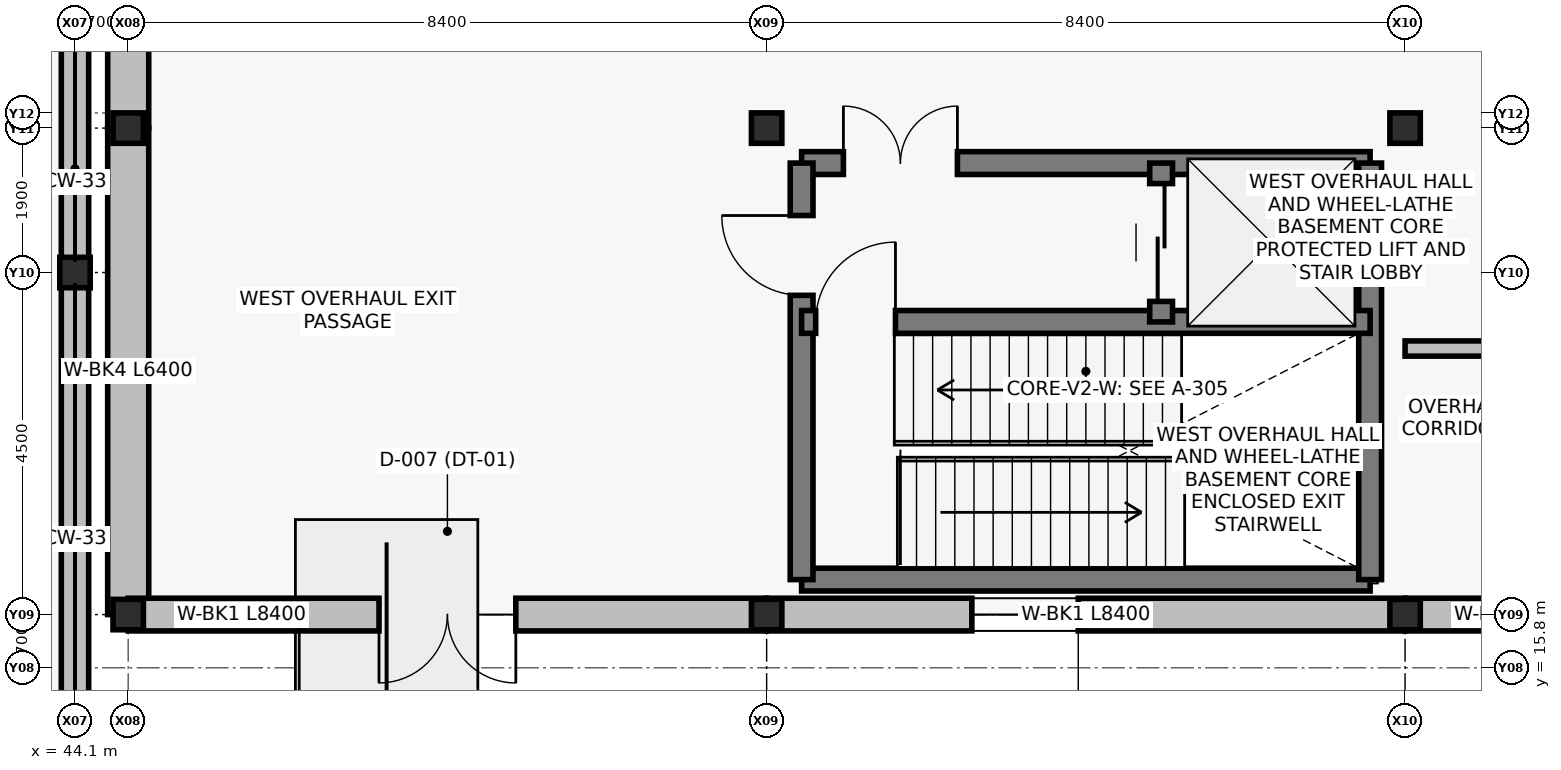
"""IFC4 building model, lengths in metres.
Left out: names, types, materials, properties, quantities, classifications, styles, units other than length and angle.
Written with IfcOpenShell. Run it as: python <this file> out.ifc"""

import sys

from ifc_helpers import new_model, si_unit, direction, frame, frame_2d, origin, origin_2d, place, context, subcontext, project, spatial, rectangle, i_section, extrude, element, fill, save


model = new_model("IFC4")
c1 = context("Model", 3, precision=1e-05, world=origin(), true_north=direction((0.0, 1.0)))
c2 = subcontext(c1, "Body", "Model", "MODEL_VIEW")
j1 = project(units=[si_unit("LENGTHUNIT", "METRE"), si_unit("PLANEANGLEUNIT", "RADIAN")], contexts=[c1])
p1 = place(None, origin())
s1 = spatial("IfcSite", under=j1, at=p1, CompositionType="ELEMENT")
p2 = place(p1, origin())
s2 = spatial("IfcBuilding", under=s1, at=p2, CompositionType="ELEMENT")
p3 = place(p2, origin())
s3 = spatial("IfcBuildingStorey", under=s2, at=p3, CompositionType="ELEMENT", Elevation=0.0)
for number, where, z_axis, x_axis in (
    (1, (44.8, 16.5, -0.35), (0.0, 0.0, 1.0), (1.0, 0.0, 0.0)),
    (2, (44.8, 22.9, -0.35), (0.0, 0.0, 1.0), (1.0, 0.0, 0.0)),
    (3, (53.2, 16.5, -0.35), (0.0, 0.0, 1.0), (1.0, 0.0, 0.0)),
    (4, (53.2, 22.9, -0.35), (0.0, 0.0, 1.0), (1.0, 0.0, 0.0)),
    (5, (61.6, 16.5, -0.35), (0.0, 0.0, 1.0), (1.0, 0.0, 0.0)),
    (6, (61.6, 22.9, -0.35), (0.0, 0.0, 1.0), (1.0, 0.0, 0.0)),
    (7, (44.1, 21.0, -0.35), (0.0, 0.0, 1.0), (1.0, 0.0, 0.0)),
):
    element("IfcColumn", number, at=place(p3, frame(where, z_axis=z_axis, x_axis=x_axis)), inside=s3, PredefinedType="COLUMN", context=c2, shape_type="SweptSolid", body=[
        extrude(i_section(OverallWidth=0.4, OverallDepth=0.4, WebThickness=0.013, FlangeThickness=0.021, at=origin_2d()), origin(), (0.0, 0.0, 1.0), 6.35),
    ])
p4 = place(p3, frame((44.8, 22.9, 0.0), z_axis=(0.0, 0.0, 1.0), x_axis=(0.0, 1.0, 0.0)))
e8 = element("IfcWall", 8, at=p4, inside=s3, PredefinedType="SOLIDWALL", context=c2, shape_type="SweptSolid", body=[
    extrude(rectangle(XDim=32.0, YDim=0.54, at=frame_2d((16.0, 0.0))), origin(), (0.0, 0.0, 1.0), 5.14),
])
p5 = place(p4, frame((1.3, 0.0, 0.0)))
e9 = element("IfcOpeningElement", 9, at=p5, cuts=e8, PredefinedType="OPENING", context=c2, shape_type="SweptSolid", body=[
    extrude(rectangle(XDim=3.8, YDim=4.4, at=frame_2d((1.9, 2.2))), frame((0.0, 0.28, 0.0), z_axis=(0.0, -1.0, 0.0), x_axis=(1.0, 0.0, 0.0)), (0.0, 0.0, 1.0), 0.56),
])
p6 = place(p4, frame((7.7, 0.0, 0.0)))
e10 = element("IfcOpeningElement", 10, at=p6, cuts=e8, PredefinedType="OPENING", context=c2, shape_type="SweptSolid", body=[
    extrude(rectangle(XDim=3.8, YDim=4.4, at=frame_2d((1.9, 2.2))), frame((0.0, 0.28, 0.0), z_axis=(0.0, -1.0, 0.0), x_axis=(1.0, 0.0, 0.0)), (0.0, 0.0, 1.0), 0.56),
])
p7 = place(p4, frame((14.1, 0.0, 0.0)))
e11 = element("IfcOpeningElement", 11, at=p7, cuts=e8, PredefinedType="OPENING", context=c2, shape_type="SweptSolid", body=[
    extrude(rectangle(XDim=3.8, YDim=4.4, at=frame_2d((1.9, 2.2))), frame((0.0, 0.28, 0.0), z_axis=(0.0, -1.0, 0.0), x_axis=(1.0, 0.0, 0.0)), (0.0, 0.0, 1.0), 0.56),
])
p8 = place(p4, frame((20.5, 0.0, 0.0)))
e12 = element("IfcOpeningElement", 12, at=p8, cuts=e8, PredefinedType="OPENING", context=c2, shape_type="SweptSolid", body=[
    extrude(rectangle(XDim=3.8, YDim=4.4, at=frame_2d((1.9, 2.2))), frame((0.0, 0.28, 0.0), z_axis=(0.0, -1.0, 0.0), x_axis=(1.0, 0.0, 0.0)), (0.0, 0.0, 1.0), 0.56),
])
p9 = place(p4, frame((26.9, 0.0, 0.0)))
e13 = element("IfcOpeningElement", 13, at=p9, cuts=e8, PredefinedType="OPENING", context=c2, shape_type="SweptSolid", body=[
    extrude(rectangle(XDim=3.8, YDim=4.4, at=frame_2d((1.9, 2.2))), frame((0.0, 0.28, 0.0), z_axis=(0.0, -1.0, 0.0), x_axis=(1.0, 0.0, 0.0)), (0.0, 0.0, 1.0), 0.56),
])
p10 = place(p3, frame((44.8, 16.5, 0.0), z_axis=(0.0, 0.0, 1.0), x_axis=(0.0, 1.0, 0.0)))
e14 = element("IfcWall", 14, at=p10, inside=s3, PredefinedType="SOLIDWALL", context=c2, shape_type="SweptSolid", body=[
    extrude(rectangle(XDim=6.4, YDim=0.54, at=frame_2d((3.2, 0.0))), origin(), (0.0, 0.0, 1.0), 5.14),
])
p11 = place(p3, frame((44.8, 16.5, 0.0), z_axis=(0.0, 0.0, 1.0), x_axis=(1.0, 0.0, 0.0)))
e15 = element("IfcWall", 15, at=p11, inside=s3, PredefinedType="SOLIDWALL", context=c2, shape_type="SweptSolid", body=[
    extrude(rectangle(XDim=8.4, YDim=0.43, at=frame_2d((4.2, 0.0))), origin(), (0.0, 0.0, 1.0), 5.14),
])
p12 = place(p11, frame((3.3, 0.0, 0.0)))
e16 = element("IfcOpeningElement", 16, at=p12, cuts=e15, PredefinedType="OPENING", context=c2, shape_type="SweptSolid", body=[
    extrude(rectangle(XDim=1.8, YDim=2.4, at=frame_2d((0.9, 1.2))), frame((0.0, 0.225, 0.0), z_axis=(0.0, -1.0, 0.0), x_axis=(1.0, 0.0, 0.0)), (0.0, 0.0, 1.0), 0.45),
])
p13 = place(p3, frame((53.2, 16.5, 0.0), z_axis=(0.0, 0.0, 1.0), x_axis=(1.0, 0.0, 0.0)))
e17 = element("IfcWall", 17, at=p13, inside=s3, PredefinedType="SOLIDWALL", context=c2, shape_type="SweptSolid", body=[
    extrude(rectangle(XDim=8.4, YDim=0.43, at=frame_2d((4.2, 0.0))), origin(), (0.0, 0.0, 1.0), 5.14),
])
p14 = place(p13, frame((2.7, 0.0, 1.1)))
e18 = element("IfcOpeningElement", 18, at=p14, cuts=e17, PredefinedType="OPENING", context=c2, shape_type="SweptSolid", body=[
    extrude(rectangle(XDim=1.4, YDim=1.6, at=frame_2d((0.7, 0.8))), frame((0.0, 0.225, 0.0), z_axis=(0.0, -1.0, 0.0), x_axis=(1.0, 0.0, 0.0)), (0.0, 0.0, 1.0), 0.45),
])
p15 = place(p3, frame((61.6, 16.5, 0.0), z_axis=(0.0, 0.0, 1.0), x_axis=(1.0, 0.0, 0.0)))
e19 = element("IfcWall", 19, at=p15, inside=s3, PredefinedType="SOLIDWALL", context=c2, shape_type="SweptSolid", body=[
    extrude(rectangle(XDim=8.4, YDim=0.43, at=frame_2d((4.2, 0.0))), origin(), (0.0, 0.0, 1.0), 5.14),
])
p16 = place(p15, frame((3.3, 0.0, 0.0)))
e20 = element("IfcOpeningElement", 20, at=p16, cuts=e19, PredefinedType="OPENING", context=c2, shape_type="SweptSolid", body=[
    extrude(rectangle(XDim=1.8, YDim=2.4, at=frame_2d((0.9, 1.2))), frame((0.0, 0.225, 0.0), z_axis=(0.0, -1.0, 0.0), x_axis=(1.0, 0.0, 0.0)), (0.0, 0.0, 1.0), 0.45),
])
for number, where, z_axis, x_axis in (
    (21, (44.1, 14.0, 0.0), (0.0, 0.0, 1.0), (0.0, 1.0, 0.0)),
    (22, (44.1, 21.0, 0.0), (0.0, 0.0, 1.0), (0.0, 1.0, 0.0)),
):
    element("IfcWall", number, at=place(p3, frame(where, z_axis=z_axis, x_axis=x_axis)), inside=s3, PredefinedType="SOLIDWALL", context=c2, shape_type="SweptSolid", body=[
        extrude(rectangle(XDim=7.0, YDim=0.36, at=frame_2d((3.5, 0.0))), origin(), (0.0, 0.0, 1.0), 1.2),
    ])
p17 = place(p3, frame((53.66, 16.96, 0.0), z_axis=(0.0, 0.0, 1.0), x_axis=(1.0, 0.0, 0.0)))
e23 = element("IfcWall", 23, at=p17, inside=s3, PredefinedType="SHEAR", context=c2, shape_type="SweptSolid", body=[
    extrude(rectangle(XDim=7.48, YDim=0.3, at=frame_2d((3.74, 0.0))), origin(), (0.0, 0.0, 1.0), 5.72),
])
p18 = place(p3, frame((53.66, 22.44, 0.0), z_axis=(0.0, 0.0, 1.0), x_axis=(1.0, 0.0, 0.0)))
e24 = element("IfcWall", 24, at=p18, inside=s3, PredefinedType="SHEAR", context=c2, shape_type="SweptSolid", body=[
    extrude(rectangle(XDim=7.48, YDim=0.3, at=frame_2d((3.74, 0.0))), origin(), (0.0, 0.0, 1.0), 5.72),
])
p19 = place(p18, frame((0.55, 0.0, 0.0)))
e25 = element("IfcOpeningElement", 25, at=p19, cuts=e24, PredefinedType="OPENING", context=c2, shape_type="SweptSolid", body=[
    extrude(rectangle(XDim=1.5, YDim=2.2, at=frame_2d((0.75, 1.1))), frame((0.0, 0.16, 0.0), z_axis=(0.0, -1.0, 0.0), x_axis=(1.0, 0.0, 0.0)), (0.0, 0.0, 1.0), 0.32),
])
p20 = place(p3, frame((53.66, 16.96, 0.0), z_axis=(0.0, 0.0, 1.0), x_axis=(0.0, 1.0, 0.0)))
e26 = element("IfcWall", 26, at=p20, inside=s3, PredefinedType="SHEAR", context=c2, shape_type="SweptSolid", body=[
    extrude(rectangle(XDim=5.48, YDim=0.3, at=frame_2d((2.74, 0.0))), origin(), (0.0, 0.0, 1.0), 5.72),
])
p21 = place(p20, frame((3.74, 0.0, 0.0)))
e27 = element("IfcOpeningElement", 27, at=p21, cuts=e26, PredefinedType="OPENING", context=c2, shape_type="SweptSolid", body=[
    extrude(rectangle(XDim=1.05, YDim=2.15, at=frame_2d((0.525, 1.075))), frame((0.0, 0.16, 0.0), z_axis=(0.0, -1.0, 0.0), x_axis=(1.0, 0.0, 0.0)), (0.0, 0.0, 1.0), 0.32),
])
p22 = place(p3, frame((61.14, 16.96, 0.0), z_axis=(0.0, 0.0, 1.0), x_axis=(0.0, 1.0, 0.0)))
e28 = element("IfcWall", 28, at=p22, inside=s3, PredefinedType="SHEAR", context=c2, shape_type="SweptSolid", body=[
    extrude(rectangle(XDim=5.48, YDim=0.3, at=frame_2d((2.74, 0.0))), origin(), (0.0, 0.0, 1.0), 5.72),
])
p23 = place(p3, frame((53.66, 20.35, 0.0), z_axis=(0.0, 0.0, 1.0), x_axis=(1.0, 0.0, 0.0)))
e29 = element("IfcWall", 29, at=p23, inside=s3, PredefinedType="SHEAR", context=c2, shape_type="SweptSolid", body=[
    extrude(rectangle(XDim=7.48, YDim=0.3, at=frame_2d((3.74, 0.0))), origin(), (0.0, 0.0, 1.0), 5.72),
])
p24 = place(p23, frame((0.185, 0.0, 0.0)))
e30 = element("IfcOpeningElement", 30, at=p24, cuts=e29, PredefinedType="OPENING", context=c2, shape_type="SweptSolid", body=[
    extrude(rectangle(XDim=1.05, YDim=2.15, at=frame_2d((0.525, 1.075))), frame((0.0, 0.16, 0.0), z_axis=(0.0, -1.0, 0.0), x_axis=(1.0, 0.0, 0.0)), (0.0, 0.0, 1.0), 0.32),
])
p25 = place(p3, frame((58.39, 20.35, 0.0), z_axis=(0.0, 0.0, 1.0), x_axis=(0.0, 1.0, 0.0)))
e31 = element("IfcWall", 31, at=p25, inside=s3, PredefinedType="SHEAR", context=c2, shape_type="SweptSolid", body=[
    extrude(rectangle(XDim=2.09, YDim=0.3, at=frame_2d((1.045, 0.0))), origin(), (0.0, 0.0, 1.0), 5.72),
])
p26 = place(p25, frame((0.27, 0.0, 0.0)))
e32 = element("IfcOpeningElement", 32, at=p26, cuts=e31, PredefinedType="OPENING", context=c2, shape_type="SweptSolid", body=[
    extrude(rectangle(XDim=1.55, YDim=2.35, at=frame_2d((0.775, 1.175))), frame((0.0, 0.16, 0.0), z_axis=(0.0, -1.0, 0.0), x_axis=(1.0, 0.0, 0.0)), (0.0, 0.0, 1.0), 0.32),
])
p27 = place(p3, frame((61.6, 20.0, 0.0), z_axis=(0.0, 0.0, 1.0), x_axis=(1.0, 0.0, 0.0)))
e33 = element("IfcWall", 33, at=p27, inside=s3, PredefinedType="PARTITIONING", context=c2, shape_type="SweptSolid", body=[
    extrude(rectangle(XDim=67.2, YDim=0.2, at=frame_2d((33.6, 0.0))), origin(), (0.0, 0.0, 1.0), 4.95),
])
p28 = place(p27, frame((18.0, 0.0, 0.0)))
e34 = element("IfcOpeningElement", 34, at=p28, cuts=e33, PredefinedType="OPENING", context=c2, shape_type="SweptSolid", body=[
    extrude(rectangle(XDim=1.6, YDim=2.2, at=frame_2d((0.8, 1.1))), frame((0.0, 0.11, 0.0), z_axis=(0.0, -1.0, 0.0), x_axis=(1.0, 0.0, 0.0)), (0.0, 0.0, 1.0), 0.22),
])
p29 = place(p27, frame((52.0, 0.0, 0.0)))
e35 = element("IfcOpeningElement", 35, at=p29, cuts=e33, PredefinedType="OPENING", context=c2, shape_type="SweptSolid", body=[
    extrude(rectangle(XDim=1.7, YDim=2.25, at=frame_2d((0.85, 1.125))), frame((0.0, 0.11, 0.0), z_axis=(0.0, -1.0, 0.0), x_axis=(1.0, 0.0, 0.0)), (0.0, 0.0, 1.0), 0.22),
])
p30 = place(p12, frame((1.8, 0.0, 0.0), z_axis=(0.0, 0.0, 1.0), x_axis=(-1.0, 0.0, 0.0)))
e36 = element("IfcDoor", 36, at=p30, inside=s3, OperationType="DOUBLE_DOOR_SINGLE_SWING", PredefinedType="DOOR", context=c2, shape_type="SweptSolid", body=[
    extrude(rectangle(XDim=1.8, YDim=2.4, at=frame_2d((0.9, 1.2))), frame((0.0, 0.025, 0.0), z_axis=(0.0, -1.0, 0.0), x_axis=(1.0, 0.0, 0.0)), (0.0, 0.0, 1.0), 0.05),
])
fill(e16, e36)
p31 = place(p14, origin())
e37 = element("IfcWindow", 37, at=p31, inside=s3, PartitioningType="SINGLE_PANEL", PredefinedType="WINDOW", context=c2, shape_type="SweptSolid", body=[
    extrude(rectangle(XDim=1.4, YDim=1.6, at=frame_2d((0.7, 0.8))), frame((0.0, 0.03, 0.0), z_axis=(0.0, -1.0, 0.0), x_axis=(1.0, 0.0, 0.0)), (0.0, 0.0, 1.0), 0.06),
])
fill(e18, e37)
p32 = place(p24, origin())
e38 = element("IfcDoor", 38, at=p32, inside=s3, OperationType="SINGLE_SWING_RIGHT", PredefinedType="DOOR", context=c2, shape_type="SweptSolid", body=[
    extrude(rectangle(XDim=1.05, YDim=2.15, at=frame_2d((0.525, 1.075))), frame((0.0, 0.025, 0.0), z_axis=(0.0, -1.0, 0.0), x_axis=(1.0, 0.0, 0.0)), (0.0, 0.0, 1.0), 0.05),
])
fill(e30, e38)
p33 = place(p19, origin())
e39 = element("IfcDoor", 39, at=p33, inside=s3, OperationType="DOUBLE_DOOR_SINGLE_SWING", PredefinedType="DOOR", context=c2, shape_type="SweptSolid", body=[
    extrude(rectangle(XDim=1.5, YDim=2.2, at=frame_2d((0.75, 1.1))), frame((0.0, 0.025, 0.0), z_axis=(0.0, -1.0, 0.0), x_axis=(1.0, 0.0, 0.0)), (0.0, 0.0, 1.0), 0.05),
])
fill(e25, e39)
p34 = place(p21, origin())
e40 = element("IfcDoor", 40, at=p34, inside=s3, OperationType="SINGLE_SWING_RIGHT", PredefinedType="DOOR", context=c2, shape_type="SweptSolid", body=[
    extrude(rectangle(XDim=1.05, YDim=2.15, at=frame_2d((0.525, 1.075))), frame((0.0, 0.025, 0.0), z_axis=(0.0, -1.0, 0.0), x_axis=(1.0, 0.0, 0.0)), (0.0, 0.0, 1.0), 0.05),
])
fill(e27, e40)
p35 = place(p26, origin())
e41 = element("IfcDoor", 41, at=p35, inside=s3, OperationType="SLIDING_TO_LEFT", PredefinedType="DOOR", context=c2, shape_type="SweptSolid", body=[
    extrude(rectangle(XDim=1.55, YDim=2.35, at=frame_2d((0.775, 1.175))), frame((0.0, 0.025, 0.0), z_axis=(0.0, -1.0, 0.0), x_axis=(1.0, 0.0, 0.0)), (0.0, 0.0, 1.0), 0.05),
])
fill(e32, e41)
save(model, sys.argv[1])
